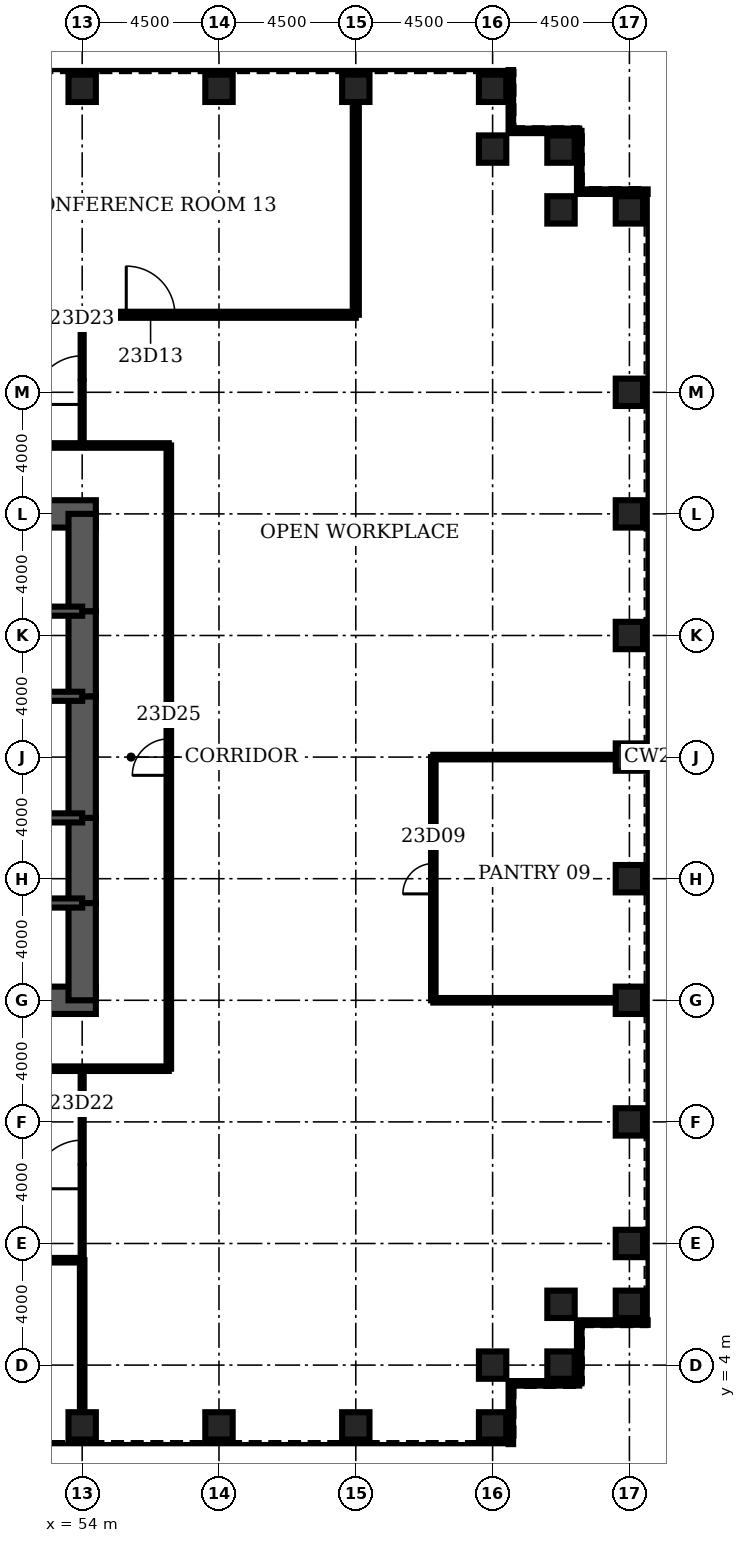
"""IFC4 building model, lengths in metres.
Left out: names, types, materials, properties, quantities, classifications, styles, units other than length and angle.
Written with IfcOpenShell. Run it as: python <this file> out.ifc"""

import sys

from ifc_helpers import new_model, si_unit, direction, frame, frame_2d, origin, origin_2d, place, context, subcontext, project, spatial, rectangle, hollow_rectangle, extrude, element, fill, save


model = new_model("IFC4")
c1 = context("Model", 3, precision=1e-05, world=origin(), true_north=direction((0.0, 1.0)))
c2 = subcontext(c1, "Body", "Model", "MODEL_VIEW")
j1 = project(units=[si_unit("LENGTHUNIT", "METRE"), si_unit("PLANEANGLEUNIT", "RADIAN")], contexts=[c1])
p1 = place(None, origin())
s1 = spatial("IfcSite", under=j1, at=p1, CompositionType="ELEMENT")
p2 = place(p1, origin())
s2 = spatial("IfcBuilding", under=s1, at=p2, CompositionType="ELEMENT")
p3 = place(p2, frame((0.0, 0.0, 108.9)))
s3 = spatial("IfcBuildingStorey", under=s2, at=p3, CompositionType="ELEMENT", Elevation=108.9)
for number, where, z_axis, x_axis in (
    (1, (54.0, 2.0, 0.0), (0.0, 0.0, 1.0), (0.0, 1.0, 0.0)),
    (2, (58.5, 2.0, 0.0), (0.0, 0.0, 1.0), (0.0, 1.0, 0.0)),
    (3, (63.0, 2.0, 0.0), (0.0, 0.0, 1.0), (0.0, 1.0, 0.0)),
    (4, (67.5, 2.0, 0.0), (0.0, 0.0, 1.0), (0.0, 1.0, 0.0)),
    (5, (67.5, 4.0, 0.0), (0.0, 0.0, 1.0), (0.0, 1.0, 0.0)),
    (6, (69.75, 4.0, 0.0), (0.0, 0.0, 1.0), (1.0, 0.0, 0.0)),
    (7, (69.75, 6.0, 0.0), (0.0, 0.0, 1.0), (1.0, 0.0, 0.0)),
    (8, (72.0, 6.0, 0.0), (0.0, 0.0, 1.0), (1.0, 0.0, 0.0)),
    (9, (72.0, 8.0, 0.0), (0.0, 0.0, 1.0), (1.0, 0.0, 0.0)),
    (10, (72.0, 12.0, 0.0), (0.0, 0.0, 1.0), (1.0, 0.0, 0.0)),
    (11, (72.0, 16.0, 0.0), (0.0, 0.0, 1.0), (1.0, 0.0, 0.0)),
    (12, (72.0, 20.0, 0.0), (0.0, 0.0, 1.0), (1.0, 0.0, 0.0)),
    (13, (72.0, 24.0, 0.0), (0.0, 0.0, 1.0), (1.0, 0.0, 0.0)),
    (14, (72.0, 28.0, 0.0), (0.0, 0.0, 1.0), (1.0, 0.0, 0.0)),
    (15, (72.0, 32.0, 0.0), (0.0, 0.0, 1.0), (1.0, 0.0, 0.0)),
    (16, (72.0, 36.0, 0.0), (0.0, 0.0, 1.0), (1.0, 0.0, 0.0)),
    (17, (72.0, 42.0, 0.0), (0.0, 0.0, 1.0), (1.0, 0.0, 0.0)),
    (18, (69.75, 42.0, 0.0), (0.0, 0.0, 1.0), (1.0, 0.0, 0.0)),
    (19, (69.75, 44.0, 0.0), (0.0, 0.0, 1.0), (1.0, 0.0, 0.0)),
    (20, (67.5, 44.0, 0.0), (0.0, 0.0, 1.0), (0.0, 1.0, 0.0)),
    (21, (67.5, 46.0, 0.0), (0.0, 0.0, 1.0), (0.0, 1.0, 0.0)),
    (22, (63.0, 46.0, 0.0), (0.0, 0.0, 1.0), (0.0, 1.0, 0.0)),
    (23, (58.5, 46.0, 0.0), (0.0, 0.0, 1.0), (0.0, 1.0, 0.0)),
    (24, (54.0, 46.0, 0.0), (0.0, 0.0, 1.0), (0.0, 1.0, 0.0)),
):
    element("IfcColumn", number, at=place(p3, frame(where, z_axis=z_axis, x_axis=x_axis)), inside=s3, PredefinedType="COLUMN", context=c2, shape_type="SweptSolid", body=[
        extrude(hollow_rectangle(XDim=0.9, YDim=0.9, WallThickness=0.11, at=origin_2d()), origin(), (0.0, 0.0, 1.0), 4.2),
    ])
for number, where, z_axis, x_axis in (
    (25, (45.0, 16.0, 0.0), (0.0, 0.0, 1.0), (1.0, 0.0, 0.0)),
    (26, (54.45, 32.0, 0.0), (0.0, 0.0, 1.0), (-1.0, 0.0, 0.0)),
):
    element("IfcWall", number, at=place(p3, frame(where, z_axis=z_axis, x_axis=x_axis)), inside=s3, PredefinedType="SHEAR", context=c2, shape_type="SweptSolid", body=[
        extrude(rectangle(XDim=9.45, YDim=0.9, at=frame_2d((4.725, 0.0))), origin(), (0.0, 0.0, 1.0), 4.2),
    ])
p4 = place(p3, frame((54.0, 16.0, 0.0), z_axis=(0.0, 0.0, 1.0), x_axis=(0.0, 1.0, 0.0)))
e27 = element("IfcWall", 27, at=p4, inside=s3, PredefinedType="SHEAR", context=c2, shape_type="SweptSolid", body=[
    extrude(rectangle(XDim=3.2, YDim=0.9, at=frame_2d((1.6, 0.0))), origin(), (0.0, 0.0, 1.0), 4.2),
])
p5 = place(p3, frame((54.0, 19.2, 0.0), z_axis=(0.0, 0.0, 1.0), x_axis=(0.0, 1.0, 0.0)))
e28 = element("IfcWall", 28, at=p5, inside=s3, PredefinedType="SHEAR", context=c2, shape_type="SweptSolid", body=[
    extrude(rectangle(XDim=2.8, YDim=0.9, at=frame_2d((1.4, 0.0))), origin(), (0.0, 0.0, 1.0), 4.2),
])
p6 = place(p5, frame((0.4, 0.0, 0.0)))
e29 = element("IfcOpeningElement", 29, at=p6, cuts=e28, PredefinedType="OPENING", context=c2, shape_type="SweptSolid", body=[
    extrude(rectangle(XDim=1.8, YDim=2.1, at=frame_2d((0.9, 1.05))), frame((0.0, 0.46, 0.0), z_axis=(0.0, -1.0, 0.0), x_axis=(1.0, 0.0, 0.0)), (0.0, 0.0, 1.0), 0.92),
])
p7 = place(p3, frame((54.0, 22.0, 0.0), z_axis=(0.0, 0.0, 1.0), x_axis=(0.0, 1.0, 0.0)))
e30 = element("IfcWall", 30, at=p7, inside=s3, PredefinedType="SHEAR", context=c2, shape_type="SweptSolid", body=[
    extrude(rectangle(XDim=4.0, YDim=0.9, at=frame_2d((2.0, 0.0))), origin(), (0.0, 0.0, 1.0), 4.2),
])
p8 = place(p3, frame((54.0, 26.0, 0.0), z_axis=(0.0, 0.0, 1.0), x_axis=(0.0, 1.0, 0.0)))
e31 = element("IfcWall", 31, at=p8, inside=s3, PredefinedType="SHEAR", context=c2, shape_type="SweptSolid", body=[
    extrude(rectangle(XDim=2.8, YDim=0.9, at=frame_2d((1.4, 0.0))), origin(), (0.0, 0.0, 1.0), 4.2),
])
p9 = place(p8, frame((0.6, 0.0, 0.0)))
e32 = element("IfcOpeningElement", 32, at=p9, cuts=e31, PredefinedType="OPENING", context=c2, shape_type="SweptSolid", body=[
    extrude(rectangle(XDim=1.8, YDim=2.1, at=frame_2d((0.9, 1.05))), frame((0.0, 0.46, 0.0), z_axis=(0.0, -1.0, 0.0), x_axis=(1.0, 0.0, 0.0)), (0.0, 0.0, 1.0), 0.92),
])
p10 = place(p3, frame((54.0, 28.8, 0.0), z_axis=(0.0, 0.0, 1.0), x_axis=(0.0, 1.0, 0.0)))
e33 = element("IfcWall", 33, at=p10, inside=s3, PredefinedType="SHEAR", context=c2, shape_type="SweptSolid", body=[
    extrude(rectangle(XDim=3.2, YDim=0.9, at=frame_2d((1.6, 0.0))), origin(), (0.0, 0.0, 1.0), 4.2),
])
p11 = place(p3, frame((45.0, 19.2, 0.0), z_axis=(0.0, 0.0, 1.0), x_axis=(1.0, 0.0, 0.0)))
e34 = element("IfcWall", 34, at=p11, inside=s3, PredefinedType="SOLIDWALL", context=c2, shape_type="SweptSolid", body=[
    extrude(rectangle(XDim=9.0, YDim=0.3, at=frame_2d((4.5, 0.0))), origin(), (0.0, 0.0, 1.0), 4.2),
])
p12 = place(p11, frame((7.35, 0.0, 0.0)))
e35 = element("IfcOpeningElement", 35, at=p12, cuts=e34, PredefinedType="OPENING", context=c2, shape_type="SweptSolid", body=[
    extrude(rectangle(XDim=1.0, YDim=2.1, at=frame_2d((0.5, 1.05))), frame((0.0, 0.16, 0.0), z_axis=(0.0, -1.0, 0.0), x_axis=(1.0, 0.0, 0.0)), (0.0, 0.0, 1.0), 0.32),
])
p13 = place(p3, frame((45.0, 28.8, 0.0), z_axis=(0.0, 0.0, 1.0), x_axis=(1.0, 0.0, 0.0)))
e36 = element("IfcWall", 36, at=p13, inside=s3, PredefinedType="SOLIDWALL", context=c2, shape_type="SweptSolid", body=[
    extrude(rectangle(XDim=9.0, YDim=0.3, at=frame_2d((4.5, 0.0))), origin(), (0.0, 0.0, 1.0), 4.2),
])
p14 = place(p13, frame((7.35, 0.0, 0.0)))
e37 = element("IfcOpeningElement", 37, at=p14, cuts=e36, PredefinedType="OPENING", context=c2, shape_type="SweptSolid", body=[
    extrude(rectangle(XDim=1.0, YDim=2.1, at=frame_2d((0.5, 1.05))), frame((0.0, 0.16, 0.0), z_axis=(0.0, -1.0, 0.0), x_axis=(1.0, 0.0, 0.0)), (0.0, 0.0, 1.0), 0.32),
])
p15 = place(p3, frame((48.0, 22.0, 0.0), z_axis=(0.0, 0.0, 1.0), x_axis=(1.0, 0.0, 0.0)))
e38 = element("IfcWall", 38, at=p15, inside=s3, PredefinedType="SOLIDWALL", context=c2, shape_type="SweptSolid", body=[
    extrude(rectangle(XDim=6.0, YDim=0.3, at=frame_2d((3.0, 0.0))), origin(), (0.0, 0.0, 1.0), 4.2),
])
p16 = place(p15, frame((2.0, 0.0, 0.0)))
e39 = element("IfcOpeningElement", 39, at=p16, cuts=e38, PredefinedType="OPENING", context=c2, shape_type="SweptSolid", body=[
    extrude(rectangle(XDim=1.0, YDim=2.1, at=frame_2d((0.5, 1.05))), frame((0.0, 0.16, 0.0), z_axis=(0.0, -1.0, 0.0), x_axis=(1.0, 0.0, 0.0)), (0.0, 0.0, 1.0), 0.32),
])
p17 = place(p15, frame((4.15, 0.0, 0.0)))
e40 = element("IfcOpeningElement", 40, at=p17, cuts=e38, PredefinedType="OPENING", context=c2, shape_type="SweptSolid", body=[
    extrude(rectangle(XDim=1.0, YDim=2.1, at=frame_2d((0.5, 1.05))), frame((0.0, 0.16, 0.0), z_axis=(0.0, -1.0, 0.0), x_axis=(1.0, 0.0, 0.0)), (0.0, 0.0, 1.0), 0.32),
])
p18 = place(p3, frame((48.0, 26.0, 0.0), z_axis=(0.0, 0.0, 1.0), x_axis=(1.0, 0.0, 0.0)))
e41 = element("IfcWall", 41, at=p18, inside=s3, PredefinedType="SOLIDWALL", context=c2, shape_type="SweptSolid", body=[
    extrude(rectangle(XDim=6.0, YDim=0.3, at=frame_2d((3.0, 0.0))), origin(), (0.0, 0.0, 1.0), 4.2),
])
p19 = place(p3, frame((45.0, 7.45, 0.0), z_axis=(0.0, 0.0, 1.0), x_axis=(1.0, 0.0, 0.0)))
e42 = element("IfcWall", 42, at=p19, inside=s3, PredefinedType="PARTITIONING", context=c2, shape_type="SweptSolid", body=[
    extrude(rectangle(XDim=9.0, YDim=0.15, at=frame_2d((4.5, 0.0))), origin(), (0.0, 0.0, 1.0), 3.0),
])
p20 = place(p19, frame((4.0, 0.0, 0.0)))
e43 = element("IfcOpeningElement", 43, at=p20, cuts=e42, PredefinedType="OPENING", context=c2, shape_type="SweptSolid", body=[
    extrude(rectangle(XDim=1.0, YDim=2.1, at=frame_2d((0.5, 1.05))), frame((0.0, 0.085, 0.0), z_axis=(0.0, -1.0, 0.0), x_axis=(1.0, 0.0, 0.0)), (0.0, 0.0, 1.0), 0.17),
])
p21 = place(p3, frame((35.0, 13.75, 0.0), z_axis=(0.0, 0.0, 1.0), x_axis=(1.0, 0.0, 0.0)))
e44 = element("IfcWall", 44, at=p21, inside=s3, PredefinedType="PARTITIONING", context=c2, shape_type="SweptSolid", body=[
    extrude(rectangle(XDim=21.85, YDim=0.15, at=frame_2d((10.925, 0.0))), origin(), (0.0, 0.0, 1.0), 3.0),
])
p22 = place(p21, frame((8.925, 0.0, 0.0)))
e45 = element("IfcOpeningElement", 45, at=p22, cuts=e44, PredefinedType="OPENING", context=c2, shape_type="SweptSolid", body=[
    extrude(rectangle(XDim=1.2, YDim=2.1, at=frame_2d((0.6, 1.05))), frame((0.0, 0.085, 0.0), z_axis=(0.0, -1.0, 0.0), x_axis=(1.0, 0.0, 0.0)), (0.0, 0.0, 1.0), 0.17),
])
for number, where, z_axis, x_axis in (
    (46, (65.55, 16.0, 0.0), (0.0, 0.0, 1.0), (1.0, 0.0, 0.0)),
    (47, (65.55, 24.0, 0.0), (0.0, 0.0, 1.0), (1.0, 0.0, 0.0)),
):
    element("IfcWall", number, at=place(p3, frame(where, z_axis=z_axis, x_axis=x_axis)), inside=s3, PredefinedType="PARTITIONING", context=c2, shape_type="SweptSolid", body=[
        extrude(rectangle(XDim=6.0, YDim=0.15, at=frame_2d((3.0, 0.0))), origin(), (0.0, 0.0, 1.0), 3.0),
    ])
p23 = place(p3, frame((15.15, 34.25, 0.0), z_axis=(0.0, 0.0, 1.0), x_axis=(1.0, 0.0, 0.0)))
e48 = element("IfcWall", 48, at=p23, inside=s3, PredefinedType="PARTITIONING", context=c2, shape_type="SweptSolid", body=[
    extrude(rectangle(XDim=41.7, YDim=0.15, at=frame_2d((20.85, 0.0))), origin(), (0.0, 0.0, 1.0), 3.0),
])
p24 = place(p23, frame((20.25, 0.0, 0.0)))
e49 = element("IfcOpeningElement", 49, at=p24, cuts=e48, PredefinedType="OPENING", context=c2, shape_type="SweptSolid", body=[
    extrude(rectangle(XDim=1.2, YDim=2.1, at=frame_2d((0.6, 1.05))), frame((0.0, 0.085, 0.0), z_axis=(0.0, -1.0, 0.0), x_axis=(1.0, 0.0, 0.0)), (0.0, 0.0, 1.0), 0.17),
])
p25 = place(p3, frame((49.5, 38.55, 0.0), z_axis=(0.0, 0.0, 1.0), x_axis=(1.0, 0.0, 0.0)))
e50 = element("IfcWall", 50, at=p25, inside=s3, PredefinedType="PARTITIONING", context=c2, shape_type="SweptSolid", body=[
    extrude(rectangle(XDim=13.5, YDim=0.2, at=frame_2d((6.75, 0.0))), origin(), (0.0, 0.0, 1.0), 3.0),
])
p26 = place(p25, frame((5.95, 0.0, 0.0)))
e51 = element("IfcOpeningElement", 51, at=p26, cuts=e50, PredefinedType="OPENING", context=c2, shape_type="SweptSolid", body=[
    extrude(rectangle(XDim=1.6, YDim=2.1, at=frame_2d((0.8, 1.05))), frame((0.0, 0.11, 0.0), z_axis=(0.0, -1.0, 0.0), x_axis=(1.0, 0.0, 0.0)), (0.0, 0.0, 1.0), 0.22),
])
p27 = place(p3, frame((54.0, 2.45, 0.0), z_axis=(0.0, 0.0, 1.0), x_axis=(0.0, 1.0, 0.0)))
e52 = element("IfcWall", 52, at=p27, inside=s3, PredefinedType="PARTITIONING", context=c2, shape_type="SweptSolid", body=[
    extrude(rectangle(XDim=5.0, YDim=0.15, at=frame_2d((2.5, 0.0))), origin(), (0.0, 0.0, 1.0), 3.0),
])
p28 = place(p3, frame((54.0, 7.45, 0.0), z_axis=(0.0, 0.0, 1.0), x_axis=(0.0, 1.0, 0.0)))
e53 = element("IfcWall", 53, at=p28, inside=s3, PredefinedType="PARTITIONING", context=c2, shape_type="SweptSolid", body=[
    extrude(rectangle(XDim=6.3, YDim=0.1, at=frame_2d((3.15, 0.0))), origin(), (0.0, 0.0, 1.0), 3.0),
])
p29 = place(p28, frame((2.35, 0.0, 0.0)))
e54 = element("IfcOpeningElement", 54, at=p29, cuts=e53, PredefinedType="OPENING", context=c2, shape_type="SweptSolid", body=[
    extrude(rectangle(XDim=1.6, YDim=2.1, at=frame_2d((0.8, 1.05))), frame((0.0, 0.06, 0.0), z_axis=(0.0, -1.0, 0.0), x_axis=(1.0, 0.0, 0.0)), (0.0, 0.0, 1.0), 0.12),
])
p30 = place(p3, frame((54.0, 34.25, 0.0), z_axis=(0.0, 0.0, 1.0), x_axis=(0.0, 1.0, 0.0)))
e55 = element("IfcWall", 55, at=p30, inside=s3, PredefinedType="PARTITIONING", context=c2, shape_type="SweptSolid", body=[
    extrude(rectangle(XDim=4.3, YDim=0.1, at=frame_2d((2.15, 0.0))), origin(), (0.0, 0.0, 1.0), 3.0),
])
p31 = place(p30, frame((1.35, 0.0, 0.0)))
e56 = element("IfcOpeningElement", 56, at=p31, cuts=e55, PredefinedType="OPENING", context=c2, shape_type="SweptSolid", body=[
    extrude(rectangle(XDim=1.6, YDim=2.1, at=frame_2d((0.8, 1.05))), frame((0.0, 0.06, 0.0), z_axis=(0.0, -1.0, 0.0), x_axis=(1.0, 0.0, 0.0)), (0.0, 0.0, 1.0), 0.12),
])
p32 = place(p3, frame((56.85, 13.75, 0.0), z_axis=(0.0, 0.0, 1.0), x_axis=(0.0, 1.0, 0.0)))
e57 = element("IfcWall", 57, at=p32, inside=s3, PredefinedType="PARTITIONING", context=c2, shape_type="SweptSolid", body=[
    extrude(rectangle(XDim=20.5, YDim=0.15, at=frame_2d((10.25, 0.0))), origin(), (0.0, 0.0, 1.0), 3.0),
])
p33 = place(p32, frame((9.65, 0.0, 0.0)))
e58 = element("IfcOpeningElement", 58, at=p33, cuts=e57, PredefinedType="OPENING", context=c2, shape_type="SweptSolid", body=[
    extrude(rectangle(XDim=1.2, YDim=2.1, at=frame_2d((0.6, 1.05))), frame((0.0, 0.085, 0.0), z_axis=(0.0, -1.0, 0.0), x_axis=(1.0, 0.0, 0.0)), (0.0, 0.0, 1.0), 0.17),
])
p34 = place(p3, frame((63.0, 38.55, 0.0), z_axis=(0.0, 0.0, 1.0), x_axis=(0.0, 1.0, 0.0)))
e59 = element("IfcWall", 59, at=p34, inside=s3, PredefinedType="PARTITIONING", context=c2, shape_type="SweptSolid", body=[
    extrude(rectangle(XDim=7.0, YDim=0.2, at=frame_2d((3.5, 0.0))), origin(), (0.0, 0.0, 1.0), 3.0),
])
p35 = place(p3, frame((65.55, 16.0, 0.0), z_axis=(0.0, 0.0, 1.0), x_axis=(0.0, 1.0, 0.0)))
e60 = element("IfcWall", 60, at=p35, inside=s3, PredefinedType="PARTITIONING", context=c2, shape_type="SweptSolid", body=[
    extrude(rectangle(XDim=8.0, YDim=0.15, at=frame_2d((4.0, 0.0))), origin(), (0.0, 0.0, 1.0), 3.0),
])
p36 = place(p35, frame((3.5, 0.0, 0.0)))
e61 = element("IfcOpeningElement", 61, at=p36, cuts=e60, PredefinedType="OPENING", context=c2, shape_type="SweptSolid", body=[
    extrude(rectangle(XDim=1.0, YDim=2.1, at=frame_2d((0.5, 1.05))), frame((0.0, 0.085, 0.0), z_axis=(0.0, -1.0, 0.0), x_axis=(1.0, 0.0, 0.0)), (0.0, 0.0, 1.0), 0.17),
])
p37 = place(p3, frame((68.1, 1.4, 0.0), z_axis=(0.0, 0.0, 1.0), x_axis=(0.0, 1.0, 0.0)))
e62 = element("IfcWall", 62, at=p37, inside=s3, PredefinedType="ELEMENTEDWALL", context=c2, shape_type="SweptSolid", body=[
    extrude(rectangle(XDim=2.0, YDim=0.15, at=frame_2d((1.0, 0.0))), origin(), (0.0, 0.0, 1.0), 4.04),
])
p38 = place(p3, frame((68.1, 3.4, 0.0), z_axis=(0.0, 0.0, 1.0), x_axis=(1.0, 0.0, 0.0)))
e63 = element("IfcWall", 63, at=p38, inside=s3, PredefinedType="ELEMENTEDWALL", context=c2, shape_type="SweptSolid", body=[
    extrude(rectangle(XDim=2.25, YDim=0.15, at=frame_2d((1.125, 0.0))), origin(), (0.0, 0.0, 1.0), 4.04),
])
p39 = place(p3, frame((70.35, 3.4, 0.0), z_axis=(0.0, 0.0, 1.0), x_axis=(0.0, 1.0, 0.0)))
e64 = element("IfcWall", 64, at=p39, inside=s3, PredefinedType="ELEMENTEDWALL", context=c2, shape_type="SweptSolid", body=[
    extrude(rectangle(XDim=2.0, YDim=0.15, at=frame_2d((1.0, 0.0))), origin(), (0.0, 0.0, 1.0), 4.04),
])
for number, where, z_axis, x_axis in (
    (65, (70.35, 5.4, 0.0), (0.0, 0.0, 1.0), (1.0, 0.0, 0.0)),
    (66, (72.6, 42.6, 0.0), (0.0, 0.0, 1.0), (-1.0, 0.0, 0.0)),
):
    element("IfcWall", number, at=place(p3, frame(where, z_axis=z_axis, x_axis=x_axis)), inside=s3, PredefinedType="ELEMENTEDWALL", context=c2, shape_type="SweptSolid", body=[
        extrude(rectangle(XDim=2.25, YDim=0.15, at=frame_2d((1.125, 0.0))), origin(), (0.0, 0.0, 1.0), 4.04),
    ])
p40 = place(p3, frame((70.35, 42.6, 0.0), z_axis=(0.0, 0.0, 1.0), x_axis=(0.0, 1.0, 0.0)))
e67 = element("IfcWall", 67, at=p40, inside=s3, PredefinedType="ELEMENTEDWALL", context=c2, shape_type="SweptSolid", body=[
    extrude(rectangle(XDim=2.0, YDim=0.15, at=frame_2d((1.0, 0.0))), origin(), (0.0, 0.0, 1.0), 4.04),
])
p41 = place(p3, frame((70.35, 44.6, 0.0), z_axis=(0.0, 0.0, 1.0), x_axis=(-1.0, 0.0, 0.0)))
e68 = element("IfcWall", 68, at=p41, inside=s3, PredefinedType="ELEMENTEDWALL", context=c2, shape_type="SweptSolid", body=[
    extrude(rectangle(XDim=2.25, YDim=0.15, at=frame_2d((1.125, 0.0))), origin(), (0.0, 0.0, 1.0), 4.04),
])
p42 = place(p3, frame((68.1, 44.6, 0.0), z_axis=(0.0, 0.0, 1.0), x_axis=(0.0, 1.0, 0.0)))
e69 = element("IfcWall", 69, at=p42, inside=s3, PredefinedType="ELEMENTEDWALL", context=c2, shape_type="SweptSolid", body=[
    extrude(rectangle(XDim=2.0, YDim=0.15, at=frame_2d((1.0, 0.0))), origin(), (0.0, 0.0, 1.0), 4.04),
])
p43 = place(p36, origin())
e70 = element("IfcDoor", 70, at=p43, inside=s3, OperationType="SINGLE_SWING_LEFT", PredefinedType="DOOR", context=c2, shape_type="SweptSolid", body=[
    extrude(rectangle(XDim=1.0, YDim=2.1, at=frame_2d((0.5, 1.05))), frame((0.0, 0.025, 0.0), z_axis=(0.0, -1.0, 0.0), x_axis=(1.0, 0.0, 0.0)), (0.0, 0.0, 1.0), 0.05),
])
fill(e61, e70)
p44 = place(p26, origin())
e71 = element("IfcDoor", 71, at=p44, inside=s3, OperationType="SINGLE_SWING_LEFT", PredefinedType="DOOR", context=c2, shape_type="SweptSolid", body=[
    extrude(rectangle(XDim=1.6, YDim=2.1, at=frame_2d((0.8, 1.05))), frame((0.0, 0.025, 0.0), z_axis=(0.0, -1.0, 0.0), x_axis=(1.0, 0.0, 0.0)), (0.0, 0.0, 1.0), 0.05),
])
fill(e51, e71)
p45 = place(p29, origin())
e72 = element("IfcDoor", 72, at=p45, inside=s3, OperationType="SINGLE_SWING_LEFT", PredefinedType="DOOR", context=c2, shape_type="SweptSolid", body=[
    extrude(rectangle(XDim=1.6, YDim=2.1, at=frame_2d((0.8, 1.05))), frame((0.0, 0.025, 0.0), z_axis=(0.0, -1.0, 0.0), x_axis=(1.0, 0.0, 0.0)), (0.0, 0.0, 1.0), 0.05),
])
fill(e54, e72)
p46 = place(p31, origin())
e73 = element("IfcDoor", 73, at=p46, inside=s3, OperationType="SINGLE_SWING_LEFT", PredefinedType="DOOR", context=c2, shape_type="SweptSolid", body=[
    extrude(rectangle(XDim=1.6, YDim=2.1, at=frame_2d((0.8, 1.05))), frame((0.0, 0.025, 0.0), z_axis=(0.0, -1.0, 0.0), x_axis=(1.0, 0.0, 0.0)), (0.0, 0.0, 1.0), 0.05),
])
fill(e56, e73)
p47 = place(p33, origin())
e74 = element("IfcDoor", 74, at=p47, inside=s3, OperationType="SINGLE_SWING_LEFT", PredefinedType="DOOR", context=c2, shape_type="SweptSolid", body=[
    extrude(rectangle(XDim=1.2, YDim=2.1, at=frame_2d((0.6, 1.05))), frame((0.0, 0.025, 0.0), z_axis=(0.0, -1.0, 0.0), x_axis=(1.0, 0.0, 0.0)), (0.0, 0.0, 1.0), 0.05),
])
fill(e58, e74)
p48 = place(p12, origin())
e75 = element("IfcDoor", 75, at=p48, inside=s3, OperationType="SINGLE_SWING_RIGHT", PredefinedType="DOOR", context=c2, shape_type="SweptSolid", body=[
    extrude(rectangle(XDim=1.0, YDim=2.1, at=frame_2d((0.5, 1.05))), frame((0.0, 0.025, 0.0), z_axis=(0.0, -1.0, 0.0), x_axis=(1.0, 0.0, 0.0)), (0.0, 0.0, 1.0), 0.05),
])
fill(e35, e75)
p49 = place(p14, origin())
e76 = element("IfcDoor", 76, at=p49, inside=s3, OperationType="SINGLE_SWING_RIGHT", PredefinedType="DOOR", context=c2, shape_type="SweptSolid", body=[
    extrude(rectangle(XDim=1.0, YDim=2.1, at=frame_2d((0.5, 1.05))), frame((0.0, 0.025, 0.0), z_axis=(0.0, -1.0, 0.0), x_axis=(1.0, 0.0, 0.0)), (0.0, 0.0, 1.0), 0.05),
])
fill(e37, e76)
p50 = place(p6, origin())
e77 = element("IfcDoor", 77, at=p50, inside=s3, OperationType="SINGLE_SWING_LEFT", PredefinedType="DOOR", context=c2, shape_type="SweptSolid", body=[
    extrude(rectangle(XDim=1.8, YDim=2.1, at=frame_2d((0.9, 1.05))), frame((0.0, 0.45, 0.0), z_axis=(0.0, -1.0, 0.0), x_axis=(1.0, 0.0, 0.0)), (0.0, 0.0, 1.0), 0.899),
])
fill(e29, e77)
p51 = place(p9, origin())
e78 = element("IfcDoor", 78, at=p51, inside=s3, OperationType="SINGLE_SWING_LEFT", PredefinedType="DOOR", context=c2, shape_type="SweptSolid", body=[
    extrude(rectangle(XDim=1.8, YDim=2.1, at=frame_2d((0.9, 1.05))), frame((0.0, 0.45, 0.0), z_axis=(0.0, -1.0, 0.0), x_axis=(1.0, 0.0, 0.0)), (0.0, 0.0, 1.0), 0.899),
])
fill(e32, e78)
p52 = place(p17, origin())
e79 = element("IfcDoor", 79, at=p52, inside=s3, OperationType="SINGLE_SWING_RIGHT", PredefinedType="DOOR", context=c2, shape_type="SweptSolid", body=[
    extrude(rectangle(XDim=1.0, YDim=2.1, at=frame_2d((0.5, 1.05))), frame((0.0, 0.025, 0.0), z_axis=(0.0, -1.0, 0.0), x_axis=(1.0, 0.0, 0.0)), (0.0, 0.0, 1.0), 0.05),
])
fill(e40, e79)
save(model, sys.argv[1])
